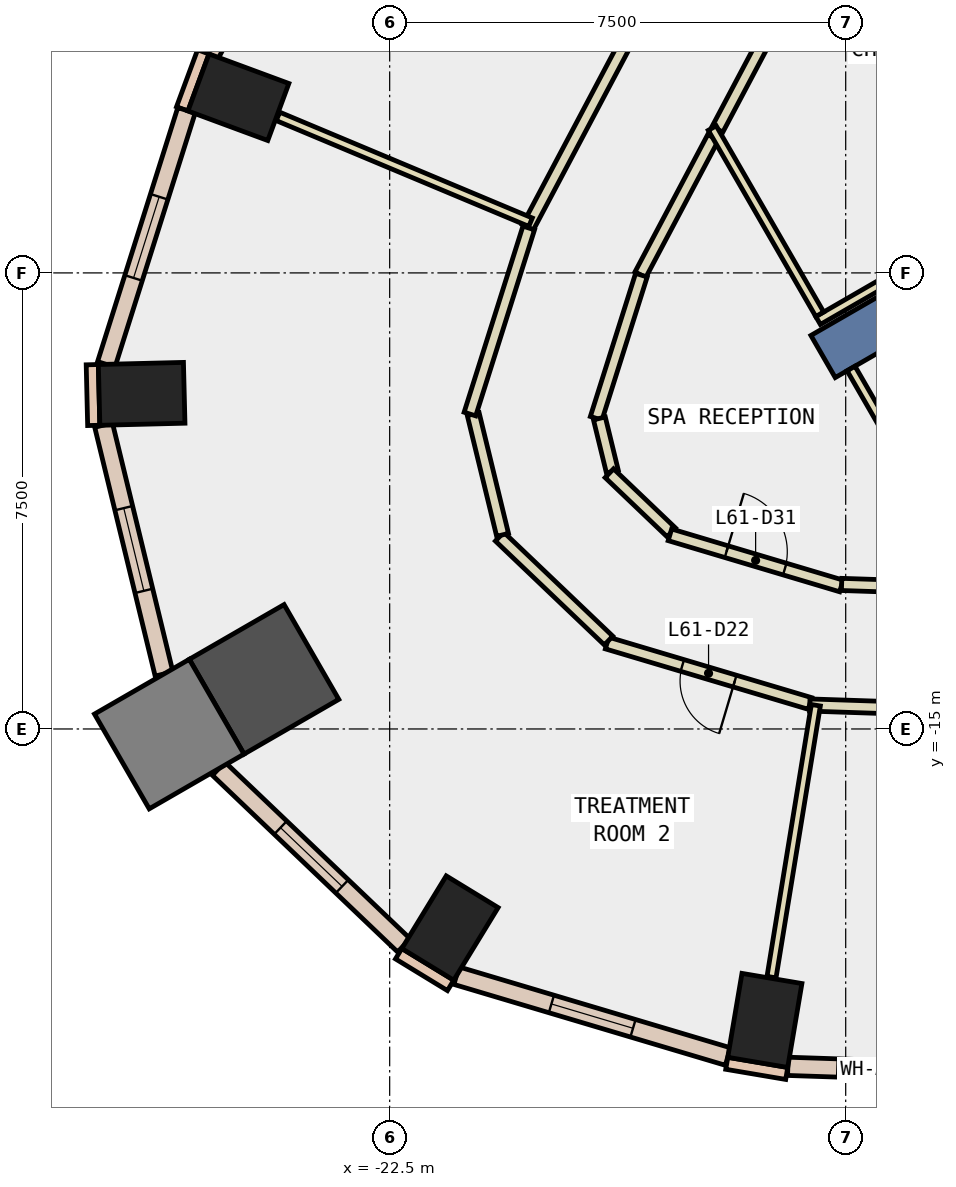
"""IFC4 building model, lengths in metres.
Left out: names, types, materials, properties, quantities, classifications, styles, units other than length and angle.
Written with IfcOpenShell. Run it as: python <this file> out.ifc"""

import sys

from ifc_helpers import new_model, si_unit, direction, frame, frame_2d, origin, origin_2d, place, context, subcontext, project, spatial, rectangle, extrude, element, fill, save


model = new_model("IFC4")
c1 = context("Model", 3, precision=1e-05, world=origin(), true_north=direction((0.0, 1.0)))
c2 = subcontext(c1, "Body", "Model", "MODEL_VIEW")
j1 = project(units=[si_unit("LENGTHUNIT", "METRE"), si_unit("PLANEANGLEUNIT", "RADIAN")], contexts=[c1])
p1 = place(None, origin())
s1 = spatial("IfcSite", under=j1, at=p1, CompositionType="ELEMENT")
p2 = place(p1, origin())
s2 = spatial("IfcBuilding", under=s1, at=p2, CompositionType="ELEMENT")
p3 = place(p2, frame((0.0, 0.0, 266.6)))
s3 = spatial("IfcBuildingStorey", under=s2, at=p3, CompositionType="ELEMENT", Elevation=266.6)
for number, where, z_axis, x_axis in (
    (1, (-16.33, -19.793, -0.34), (0.0, 0.0, 1.0), (-0.986, 0.167, 0.0)),
    (2, (-24.988, -4.611, -0.34), (0.0, 0.0, 1.0), (0.347, 0.938, 0.0)),
    (3, (-26.579, -9.489, -0.34), (0.0, 0.0, 1.0), (-0.025, 1.0, 0.0)),
):
    element("IfcColumn", number, at=place(p3, frame(where, z_axis=z_axis, x_axis=x_axis)), inside=s3, PredefinedType="COLUMN", context=c2, shape_type="SweptSolid", body=[
        extrude(rectangle(XDim=1.0, YDim=1.4, at=origin_2d()), origin(), (0.0, 0.0, 1.0), 3.6),
    ])
p4 = place(p3, frame((-24.566, -14.184, -0.34), z_axis=(0.0, 0.0, 1.0), x_axis=(0.866025403784, 0.5, 0.0)))
e4 = element("IfcColumn", 4, at=p4, inside=s3, PredefinedType="COLUMN", context=c2, shape_type="SweptSolid", body=[
    extrude(rectangle(XDim=1.8, YDim=1.8, at=origin_2d()), origin(), (0.0, 0.0, 1.0), 3.6),
])
p5 = place(p3, frame((-21.508, -18.274, -0.34), z_axis=(0.0, 0.0, 1.0), x_axis=(-0.853341581839, 0.521352227103, 0.0)))
e5 = element("IfcColumn", 5, at=p5, inside=s3, PredefinedType="COLUMN", context=c2, shape_type="SweptSolid", body=[
    extrude(rectangle(XDim=1.0, YDim=1.4, at=origin_2d()), origin(), (0.0, 0.0, 1.0), 3.6),
])
p6 = place(p3, frame((-26.125, -15.084, -0.34), z_axis=(0.0, 0.0, 1.0), x_axis=(0.866025403784, 0.5, 0.0)))
e6 = element("IfcColumn", 6, at=p6, inside=s3, PredefinedType="COLUMN", context=c2, shape_type="SweptSolid", body=[
    extrude(rectangle(XDim=1.8, YDim=1.8, at=origin_2d()), origin(), (0.0, 0.0, 1.0), 3.6),
])
p7 = place(p3, frame((-7.578, -4.375, -0.34), z_axis=(0.0, 0.0, 1.0), x_axis=(-0.866024315419, -0.5000018851, 0.0)))
e7 = element("IfcWall", 7, at=p7, inside=s3, PredefinedType="SHEAR", context=c2, shape_type="SweptSolid", body=[
    extrude(rectangle(XDim=9.0, YDim=0.8, at=frame_2d((4.5, 0.0))), origin(), (0.0, 0.0, 1.0), 3.6),
])
for number, where, z_axis, x_axis in (
    (8, (-25.565, -3.865, 0.0), (0.0, 0.0, 1.0), (-0.347, -0.938, 0.0)),
    (9, (-16.956, -20.498, 0.0), (0.0, 0.0, 1.0), (0.986, -0.167, 0.0)),
):
    element("IfcWall", number, at=place(p3, frame(where, z_axis=z_axis, x_axis=x_axis)), inside=s3, PredefinedType="STANDARD", context=c2, shape_type="SweptSolid", body=[
        extrude(rectangle(XDim=1.0, YDim=0.2, at=frame_2d((0.5, 0.0))), origin(), (0.0, 0.0, 1.0), 3.26),
    ])
p8 = place(p3, frame((-27.391, -9.009, 0.0), z_axis=(0.0, 0.0, 1.0), x_axis=(0.024186470916, -0.999707464524, 0.0)))
e10 = element("IfcWall", 10, at=p8, inside=s3, PredefinedType="STANDARD", context=c2, shape_type="SweptSolid", body=[
    extrude(rectangle(XDim=0.999, YDim=0.2, at=frame_2d((0.5, 0.0))), origin(), (0.0, 0.0, 1.0), 3.26),
])
p9 = place(p3, frame((-22.352, -18.696, 0.0), z_axis=(0.0, 0.0, 1.0), x_axis=(0.853679739553, -0.520798331677, 0.0)))
e11 = element("IfcWall", 11, at=p9, inside=s3, PredefinedType="STANDARD", context=c2, shape_type="SweptSolid", body=[
    extrude(rectangle(XDim=1.0, YDim=0.2, at=frame_2d((0.5, 0.0))), origin(), (0.0, 0.0, 1.0), 3.26),
])
p10 = place(p3, frame((-15.951, -20.548, 0.0), z_axis=(0.0, 0.0, 1.0), x_axis=(0.999450376985, -0.033150323459, 0.0)))
e12 = element("IfcWall", 12, at=p10, inside=s3, PredefinedType="STANDARD", context=c2, shape_type="SweptSolid", body=[
    extrude(rectangle(XDim=7.659, YDim=0.3, at=frame_2d((3.83, 0.0))), origin(), (0.0, 0.0, 1.0), 3.26),
])
p11 = place(p10, frame((0.815, 0.0, 0.9)))
e13 = element("IfcOpeningElement", 13, at=p11, cuts=e12, PredefinedType="OPENING", context=c2, shape_type="SweptSolid", body=[
    extrude(rectangle(XDim=2.2, YDim=2.0, at=frame_2d((1.1, 1.0))), frame((0.0, 0.16, 0.0), z_axis=(0.0, -1.0, 0.0), x_axis=(1.0, 0.0, 0.0)), (0.0, 0.0, 1.0), 0.32),
])
p12 = place(p10, frame((4.644, 0.0, 0.9)))
e14 = element("IfcOpeningElement", 14, at=p12, cuts=e12, PredefinedType="OPENING", context=c2, shape_type="SweptSolid", body=[
    extrude(rectangle(XDim=2.2, YDim=2.0, at=frame_2d((1.1, 1.0))), frame((0.0, 0.16, 0.0), z_axis=(0.0, -1.0, 0.0), x_axis=(1.0, 0.0, 0.0)), (0.0, 0.0, 1.0), 0.32),
])
p13 = place(p3, frame((-22.784, 1.132, 0.0), z_axis=(0.0, 0.0, 1.0), x_axis=(-0.468220106253, -0.883611867338, 0.0)))
e15 = element("IfcWall", 15, at=p13, inside=s3, PredefinedType="STANDARD", context=c2, shape_type="SweptSolid", body=[
    extrude(rectangle(XDim=5.703, YDim=0.3, at=frame_2d((2.852, 0.0))), origin(), (0.0, 0.0, 1.0), 3.26),
])
p14 = place(p13, frame((0.476, 0.0, 0.9)))
e16 = element("IfcOpeningElement", 16, at=p14, cuts=e15, PredefinedType="OPENING", context=c2, shape_type="SweptSolid", body=[
    extrude(rectangle(XDim=1.9, YDim=2.0, at=frame_2d((0.95, 1.0))), frame((0.0, 0.16, 0.0), z_axis=(0.0, -1.0, 0.0), x_axis=(1.0, 0.0, 0.0)), (0.0, 0.0, 1.0), 0.32),
])
p15 = place(p13, frame((3.327, 0.0, 0.9)))
e17 = element("IfcOpeningElement", 17, at=p15, cuts=e15, PredefinedType="OPENING", context=c2, shape_type="SweptSolid", body=[
    extrude(rectangle(XDim=1.9, YDim=2.0, at=frame_2d((0.95, 1.0))), frame((0.0, 0.16, 0.0), z_axis=(0.0, -1.0, 0.0), x_axis=(1.0, 0.0, 0.0)), (0.0, 0.0, 1.0), 0.32),
])
p16 = place(p3, frame((-25.842, -4.827, 0.0), z_axis=(0.0, 0.0, 1.0), x_axis=(-0.30108868778, -0.953596142028, 0.0)))
e18 = element("IfcWall", 18, at=p16, inside=s3, PredefinedType="STANDARD", context=c2, shape_type="SweptSolid", body=[
    extrude(rectangle(XDim=4.38, YDim=0.3, at=frame_2d((2.19, 0.0))), origin(), (0.0, 0.0, 1.0), 3.26),
])
p17 = place(p16, frame((1.49, 0.0, 0.9)))
e19 = element("IfcOpeningElement", 19, at=p17, cuts=e18, PredefinedType="OPENING", context=c2, shape_type="SweptSolid", body=[
    extrude(rectangle(XDim=1.4, YDim=2.0, at=frame_2d((0.7, 1.0))), frame((0.0, 0.16, 0.0), z_axis=(0.0, -1.0, 0.0), x_axis=(1.0, 0.0, 0.0)), (0.0, 0.0, 1.0), 0.32),
])
p18 = place(p3, frame((-27.205, -10.003, 0.0), z_axis=(0.0, 0.0, 1.0), x_axis=(0.236077883519, -0.97173413695, 0.0)))
e20 = element("IfcWall", 20, at=p18, inside=s3, PredefinedType="STANDARD", context=c2, shape_type="SweptSolid", body=[
    extrude(rectangle(XDim=4.211, YDim=0.3, at=frame_2d((2.105, 0.0))), origin(), (0.0, 0.0, 1.0), 3.26),
])
p19 = place(p18, frame((1.405, 0.0, 0.9)))
e21 = element("IfcOpeningElement", 21, at=p19, cuts=e20, PredefinedType="OPENING", context=c2, shape_type="SweptSolid", body=[
    extrude(rectangle(XDim=1.4, YDim=2.0, at=frame_2d((0.7, 1.0))), frame((0.0, 0.16, 0.0), z_axis=(0.0, -1.0, 0.0), x_axis=(1.0, 0.0, 0.0)), (0.0, 0.0, 1.0), 0.32),
])
p20 = place(p3, frame((-25.312, -15.653, 0.0), z_axis=(0.0, 0.0, 1.0), x_axis=(0.723526681061, -0.690296415892, 0.0)))
e22 = element("IfcWall", 22, at=p20, inside=s3, PredefinedType="STANDARD", context=c2, shape_type="SweptSolid", body=[
    extrude(rectangle(XDim=4.21, YDim=0.3, at=frame_2d((2.105, 0.0))), origin(), (0.0, 0.0, 1.0), 3.26),
])
p21 = place(p20, frame((1.405, 0.0, 0.9)))
e23 = element("IfcOpeningElement", 23, at=p21, cuts=e22, PredefinedType="OPENING", context=c2, shape_type="SweptSolid", body=[
    extrude(rectangle(XDim=1.4, YDim=2.0, at=frame_2d((0.7, 1.0))), frame((0.0, 0.16, 0.0), z_axis=(0.0, -1.0, 0.0), x_axis=(1.0, 0.0, 0.0)), (0.0, 0.0, 1.0), 0.32),
])
p22 = place(p3, frame((-21.401, -19.057, 0.0), z_axis=(0.0, 0.0, 1.0), x_axis=(0.958361270465, -0.285558532131, 0.0)))
e24 = element("IfcWall", 24, at=p22, inside=s3, PredefinedType="STANDARD", context=c2, shape_type="SweptSolid", body=[
    extrude(rectangle(XDim=4.658, YDim=0.3, at=frame_2d((2.329, 0.0))), origin(), (0.0, 0.0, 1.0), 3.26),
])
p23 = place(p22, frame((1.629, 0.0, 0.9)))
e25 = element("IfcOpeningElement", 25, at=p23, cuts=e24, PredefinedType="OPENING", context=c2, shape_type="SweptSolid", body=[
    extrude(rectangle(XDim=1.4, YDim=2.0, at=frame_2d((0.7, 1.0))), frame((0.0, 0.16, 0.0), z_axis=(0.0, -1.0, 0.0), x_axis=(1.0, 0.0, 0.0)), (0.0, 0.0, 1.0), 0.32),
])
p24 = place(p3, frame((-15.56, -2.214, 0.0), z_axis=(0.0, 0.0, 1.0), x_axis=(-0.468104679961, -0.883673021314, 0.0)))
e26 = element("IfcWall", 26, at=p24, inside=s3, PredefinedType="PARTITIONING", context=c2, shape_type="SweptSolid", body=[
    extrude(rectangle(XDim=3.309, YDim=0.2, at=frame_2d((1.654, 0.0))), origin(), (0.0, 0.0, 1.0), 3.26),
])
p25 = place(p3, frame((-17.18, -5.271, 0.0), z_axis=(0.0, 0.0, 1.0), x_axis=(-0.468212372113, -0.883615965564, 0.0)))
e27 = element("IfcWall", 27, at=p25, inside=s3, PredefinedType="PARTITIONING", context=c2, shape_type="SweptSolid", body=[
    extrude(rectangle(XDim=2.557, YDim=0.2, at=frame_2d((1.278, 0.0))), origin(), (0.0, 0.0, 1.0), 3.26),
])
p26 = place(p3, frame((-18.36, -7.537, 0.0), z_axis=(0.0, 0.0, 1.0), x_axis=(-0.301325410186, -0.953521366922, 0.0)))
e28 = element("IfcWall", 28, at=p26, inside=s3, PredefinedType="PARTITIONING", context=c2, shape_type="SweptSolid", body=[
    extrude(rectangle(XDim=2.469, YDim=0.2, at=frame_2d((1.234, 0.0))), origin(), (0.0, 0.0, 1.0), 3.26),
])
p27 = place(p3, frame((-19.051, -9.893, 0.0), z_axis=(0.0, 0.0, 1.0), x_axis=(0.237162553963, -0.971469980492, 0.0)))
e29 = element("IfcWall", 29, at=p27, inside=s3, PredefinedType="PARTITIONING", context=c2, shape_type="SweptSolid", body=[
    extrude(rectangle(XDim=0.899, YDim=0.2, at=frame_2d((0.449, 0.0))), origin(), (0.0, 0.0, 1.0), 3.26),
])
p28 = place(p3, frame((-18.887, -10.794, 0.0), z_axis=(0.0, 0.0, 1.0), x_axis=(0.723206051435, -0.690632324155, 0.0)))
e30 = element("IfcWall", 30, at=p28, inside=s3, PredefinedType="PARTITIONING", context=c2, shape_type="SweptSolid", body=[
    extrude(rectangle(XDim=1.409, YDim=0.2, at=frame_2d((0.705, 0.0))), origin(), (0.0, 0.0, 1.0), 3.26),
])
p29 = place(p3, frame((-17.891, -11.807, 0.0), z_axis=(0.0, 0.0, 1.0), x_axis=(0.958288558025, -0.28580244848, 0.0)))
e31 = element("IfcWall", 31, at=p29, inside=s3, PredefinedType="PARTITIONING", context=c2, shape_type="SweptSolid", body=[
    extrude(rectangle(XDim=2.943, YDim=0.2, at=frame_2d((1.471, 0.0))), origin(), (0.0, 0.0, 1.0), 3.26),
])
p30 = place(p29, frame((0.971, 0.0, 0.0)))
e32 = element("IfcOpeningElement", 32, at=p30, cuts=e31, PredefinedType="OPENING", context=c2, shape_type="SweptSolid", body=[
    extrude(rectangle(XDim=1.0, YDim=2.1, at=frame_2d((0.5, 1.05))), frame((0.0, 0.11, 0.0), z_axis=(0.0, -1.0, 0.0), x_axis=(1.0, 0.0, 0.0)), (0.0, 0.0, 1.0), 0.22),
])
p31 = place(p3, frame((-15.067, -12.623, 0.0), z_axis=(0.0, 0.0, 1.0), x_axis=(0.99945112134, -0.033127874247, 0.0)))
e33 = element("IfcWall", 33, at=p31, inside=s3, PredefinedType="PARTITIONING", context=c2, shape_type="SweptSolid", body=[
    extrude(rectangle(XDim=2.174, YDim=0.2, at=frame_2d((1.087, 0.0))), origin(), (0.0, 0.0, 1.0), 3.26),
])
p32 = place(p3, frame((-20.229, -6.754, 0.0), z_axis=(0.0, 0.0, 1.0), x_axis=(0.468313568794, 0.883562335822, 0.0)))
e34 = element("IfcWall", 34, at=p32, inside=s3, PredefinedType="PARTITIONING", context=c2, shape_type="SweptSolid", body=[
    extrude(rectangle(XDim=6.216, YDim=0.2, at=frame_2d((3.108, 0.0))), origin(), (0.0, 0.0, 1.0), 3.26),
])
p33 = place(p3, frame((-15.587, -14.581, 0.0), z_axis=(0.0, 0.0, 1.0), x_axis=(-0.958378336681, 0.285501250052, 0.0)))
e35 = element("IfcWall", 35, at=p33, inside=s3, PredefinedType="PARTITIONING", context=c2, shape_type="SweptSolid", body=[
    extrude(rectangle(XDim=3.482, YDim=0.2, at=frame_2d((1.741, 0.0))), origin(), (0.0, 0.0, 1.0), 3.26),
])
p34 = place(p33, frame((1.291, 0.0, 0.0)))
e36 = element("IfcOpeningElement", 36, at=p34, cuts=e35, PredefinedType="OPENING", context=c2, shape_type="SweptSolid", body=[
    extrude(rectangle(XDim=0.9, YDim=2.1, at=frame_2d((0.45, 1.05))), frame((0.0, 0.11, 0.0), z_axis=(0.0, -1.0, 0.0), x_axis=(1.0, 0.0, 0.0)), (0.0, 0.0, 1.0), 0.22),
])
p35 = place(p3, frame((-18.9, -13.546, 0.0), z_axis=(0.0, 0.0, 1.0), x_axis=(-0.723668833869, 0.690147389248, 0.0)))
e37 = element("IfcWall", 37, at=p35, inside=s3, PredefinedType="PARTITIONING", context=c2, shape_type="SweptSolid", body=[
    extrude(rectangle(XDim=2.476, YDim=0.2, at=frame_2d((1.238, 0.0))), origin(), (0.0, 0.0, 1.0), 3.26),
])
p36 = place(p3, frame((-20.643, -11.808, 0.0), z_axis=(0.0, 0.0, 1.0), x_axis=(-0.236372924437, 0.971662410816, 0.0)))
e38 = element("IfcWall", 38, at=p36, inside=s3, PredefinedType="PARTITIONING", context=c2, shape_type="SweptSolid", body=[
    extrude(rectangle(XDim=2.043, YDim=0.2, at=frame_2d((1.021, 0.0))), origin(), (0.0, 0.0, 1.0), 3.26),
])
p37 = place(p3, frame((-21.18, -9.821, 0.0), z_axis=(0.0, 0.0, 1.0), x_axis=(0.301331608119, 0.953519408271, 0.0)))
e39 = element("IfcWall", 39, at=p37, inside=s3, PredefinedType="PARTITIONING", context=c2, shape_type="SweptSolid", body=[
    extrude(rectangle(XDim=3.209, YDim=0.2, at=frame_2d((1.604, 0.0))), origin(), (0.0, 0.0, 1.0), 3.26),
])
p38 = place(p3, frame((-7.7, -14.869, 0.0), z_axis=(0.0, 0.0, 1.0), x_axis=(-0.999445318732, 0.03330247535, 0.0)))
e40 = element("IfcWall", 40, at=p38, inside=s3, PredefinedType="PARTITIONING", context=c2, shape_type="SweptSolid", body=[
    extrude(rectangle(XDim=7.896, YDim=0.2, at=frame_2d((3.948, 0.0))), origin(), (0.0, 0.0, 1.0), 3.26),
])
p39 = place(p38, frame((3.498, 0.0, 0.0)))
e41 = element("IfcOpeningElement", 41, at=p39, cuts=e40, PredefinedType="OPENING", context=c2, shape_type="SweptSolid", body=[
    extrude(rectangle(XDim=0.9, YDim=2.1, at=frame_2d((0.45, 1.05))), frame((0.0, 0.11, 0.0), z_axis=(0.0, -1.0, 0.0), x_axis=(1.0, 0.0, 0.0)), (0.0, 0.0, 1.0), 0.22),
])
p40 = place(p3, frame((-9.24, -4.695, 0.0), z_axis=(0.0, 0.0, 1.0), x_axis=(-0.866015037582, -0.500017954359, 0.0)))
e42 = element("IfcWall", 42, at=p40, inside=s3, PredefinedType="PARTITIONING", context=c2, shape_type="SweptSolid", body=[
    extrude(rectangle(XDim=7.176, YDim=0.15, at=frame_2d((3.588, 0.0))), origin(), (0.0, 0.0, 1.0), 3.26),
])
p41 = place(p3, frame((-15.427, -8.18, 0.0), z_axis=(0.0, 0.0, 1.0), x_axis=(-0.500045204515, 0.865999303373, 0.0)))
e43 = element("IfcWall", 43, at=p41, inside=s3, PredefinedType="PARTITIONING", context=c2, shape_type="SweptSolid", body=[
    extrude(rectangle(XDim=3.536, YDim=0.15, at=frame_2d((1.768, 0.0))), origin(), (0.0, 0.0, 1.0), 3.26),
])
p42 = place(p3, frame((-12.769, -12.784, 0.0), z_axis=(0.0, 0.0, 1.0), x_axis=(-0.499998569178, 0.866026229868, 0.0)))
e44 = element("IfcWall", 44, at=p42, inside=s3, PredefinedType="PARTITIONING", context=c2, shape_type="SweptSolid", body=[
    extrude(rectangle(XDim=4.286, YDim=0.15, at=frame_2d((2.143, 0.0))), origin(), (0.0, 0.0, 1.0), 3.26),
])
p43 = place(p3, frame((-20.183, -6.666, 0.0), z_axis=(0.0, 0.0, 1.0), x_axis=(-0.922347108299, 0.386362280525, 0.0)))
e45 = element("IfcWall", 45, at=p43, inside=s3, PredefinedType="PARTITIONING", context=c2, shape_type="SweptSolid", body=[
    extrude(rectangle(XDim=4.503, YDim=0.15, at=frame_2d((2.252, 0.0))), origin(), (0.0, 0.0, 1.0), 3.26),
])
p44 = place(p3, frame((-15.491, -14.61, 0.0), z_axis=(0.0, 0.0, 1.0), x_axis=(-0.160928343418, -0.986966092774, 0.0)))
e46 = element("IfcWall", 46, at=p44, inside=s3, PredefinedType="PARTITIONING", context=c2, shape_type="SweptSolid", body=[
    extrude(rectangle(XDim=4.53, YDim=0.15, at=frame_2d((2.265, 0.0))), origin(), (0.0, 0.0, 1.0), 3.26),
])
p45 = place(p11, origin())
e47 = element("IfcWindow", 47, at=p45, inside=s3, PartitioningType="SINGLE_PANEL", PredefinedType="WINDOW", context=c2, shape_type="SweptSolid", body=[
    extrude(rectangle(XDim=2.2, YDim=2.0, at=frame_2d((1.1, 1.0))), frame((0.0, 0.03, 0.0), z_axis=(0.0, -1.0, 0.0), x_axis=(1.0, 0.0, 0.0)), (0.0, 0.0, 1.0), 0.06),
])
fill(e13, e47)
p46 = place(p17, origin())
e48 = element("IfcWindow", 48, at=p46, inside=s3, PartitioningType="SINGLE_PANEL", PredefinedType="WINDOW", context=c2, shape_type="SweptSolid", body=[
    extrude(rectangle(XDim=1.4, YDim=2.0, at=frame_2d((0.7, 1.0))), frame((0.0, 0.03, 0.0), z_axis=(0.0, -1.0, 0.0), x_axis=(1.0, 0.0, 0.0)), (0.0, 0.0, 1.0), 0.06),
])
fill(e19, e48)
p47 = place(p19, origin())
e49 = element("IfcWindow", 49, at=p47, inside=s3, PartitioningType="SINGLE_PANEL", PredefinedType="WINDOW", context=c2, shape_type="SweptSolid", body=[
    extrude(rectangle(XDim=1.4, YDim=2.0, at=frame_2d((0.7, 1.0))), frame((0.0, 0.03, 0.0), z_axis=(0.0, -1.0, 0.0), x_axis=(1.0, 0.0, 0.0)), (0.0, 0.0, 1.0), 0.06),
])
fill(e21, e49)
p48 = place(p21, origin())
e50 = element("IfcWindow", 50, at=p48, inside=s3, PartitioningType="SINGLE_PANEL", PredefinedType="WINDOW", context=c2, shape_type="SweptSolid", body=[
    extrude(rectangle(XDim=1.4, YDim=2.0, at=frame_2d((0.7, 1.0))), frame((0.0, 0.03, 0.0), z_axis=(0.0, -1.0, 0.0), x_axis=(1.0, 0.0, 0.0)), (0.0, 0.0, 1.0), 0.06),
])
fill(e23, e50)
p49 = place(p23, origin())
e51 = element("IfcWindow", 51, at=p49, inside=s3, PartitioningType="SINGLE_PANEL", PredefinedType="WINDOW", context=c2, shape_type="SweptSolid", body=[
    extrude(rectangle(XDim=1.4, YDim=2.0, at=frame_2d((0.7, 1.0))), frame((0.0, 0.03, 0.0), z_axis=(0.0, -1.0, 0.0), x_axis=(1.0, 0.0, 0.0)), (0.0, 0.0, 1.0), 0.06),
])
fill(e25, e51)
p50 = place(p34, origin())
e52 = element("IfcDoor", 52, at=p50, inside=s3, OperationType="SINGLE_SWING_LEFT", PredefinedType="DOOR", context=c2, shape_type="SweptSolid", body=[
    extrude(rectangle(XDim=0.9, YDim=2.1, at=frame_2d((0.45, 1.05))), frame((0.0, 0.025, 0.0), z_axis=(0.0, -1.0, 0.0), x_axis=(1.0, 0.0, 0.0)), (0.0, 0.0, 1.0), 0.05),
])
fill(e36, e52)
p51 = place(p30, origin())
e53 = element("IfcDoor", 53, at=p51, inside=s3, OperationType="SINGLE_SWING_LEFT", PredefinedType="DOOR", context=c2, shape_type="SweptSolid", body=[
    extrude(rectangle(XDim=1.0, YDim=2.1, at=frame_2d((0.5, 1.05))), frame((0.0, 0.025, 0.0), z_axis=(0.0, -1.0, 0.0), x_axis=(1.0, 0.0, 0.0)), (0.0, 0.0, 1.0), 0.05),
])
fill(e32, e53)
save(model, sys.argv[1])
